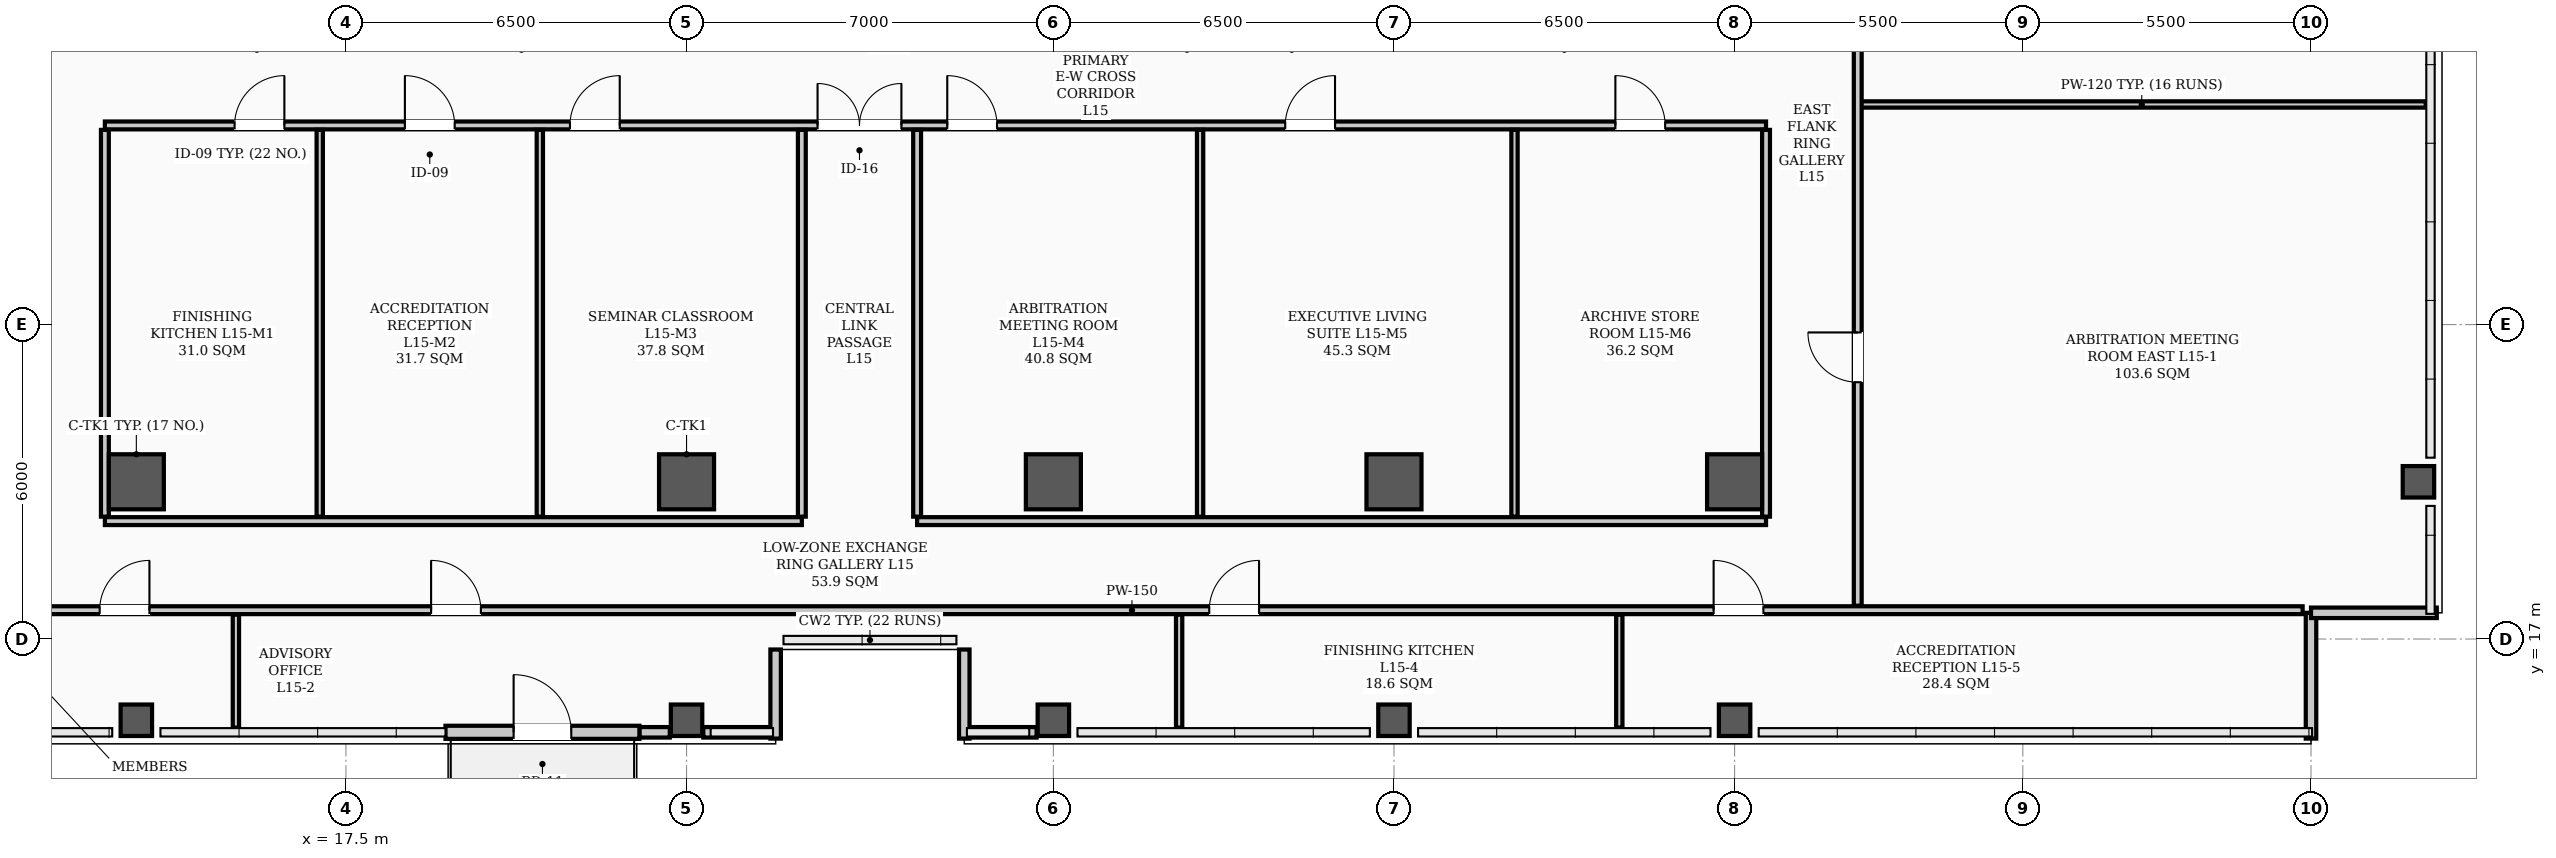
"""IFC4 building model, lengths in metres.
Left out: names, types, materials, properties, quantities, classifications, styles, units other than length and angle.
Written with IfcOpenShell. Run it as: python <this file> out.ifc"""

import sys

from ifc_helpers import new_model, si_unit, direction, frame, frame_2d, origin, origin_2d, place, context, subcontext, project, spatial, rectangle, hollow_rectangle, extrude, element, fill, save


model = new_model("IFC4")
c1 = context("Model", 3, precision=1e-05, world=origin(), true_north=direction((0.0, 1.0)))
c2 = subcontext(c1, "Body", "Model", "MODEL_VIEW")
j1 = project(units=[si_unit("LENGTHUNIT", "METRE"), si_unit("PLANEANGLEUNIT", "RADIAN")], contexts=[c1])
p1 = place(None, origin())
s1 = spatial("IfcSite", under=j1, at=p1, CompositionType="ELEMENT")
p2 = place(p1, origin())
s2 = spatial("IfcBuilding", under=s1, at=p2, CompositionType="ELEMENT")
p3 = place(p2, frame((0.0, 0.0, 61.6)))
s3 = spatial("IfcBuildingStorey", under=s2, at=p3, CompositionType="ELEMENT", Elevation=61.6)
for number, where, z_axis, x_axis in (
    (1, (13.5, 20.0, 0.0), (0.0, 0.0, 1.0), (1.0, 0.0, 0.0)),
    (2, (24.0, 20.0, 0.0), (0.0, 0.0, 1.0), (1.0, 0.0, 0.0)),
    (3, (31.0, 20.0, 0.0), (0.0, 0.0, 1.0), (1.0, 0.0, 0.0)),
    (4, (37.5, 20.0, 0.0), (0.0, 0.0, 1.0), (1.0, 0.0, 0.0)),
    (5, (44.0, 20.0, 0.0), (0.0, 0.0, 1.0), (1.0, 0.0, 0.0)),
):
    element("IfcColumn", number, at=place(p3, frame(where, z_axis=z_axis, x_axis=x_axis)), inside=s3, PredefinedType="COLUMN", context=c2, shape_type="SweptSolid", body=[
        extrude(hollow_rectangle(XDim=1.05, YDim=1.05, WallThickness=0.038, InnerFilletRadius=0.019, OuterFilletRadius=0.057, at=origin_2d()), origin(), (0.0, 0.0, 1.0), 3.9),
    ])
for number, where, z_axis, x_axis in (
    (6, (13.5, 15.45, 0.0), (0.0, 0.0, 1.0), (1.0, 0.0, 0.0)),
    (7, (24.0, 15.45, 0.0), (0.0, 0.0, 1.0), (1.0, 0.0, 0.0)),
    (8, (31.0, 15.45, 0.0), (0.0, 0.0, 1.0), (1.0, 0.0, 0.0)),
    (9, (37.5, 15.45, 0.0), (0.0, 0.0, 1.0), (1.0, 0.0, 0.0)),
    (10, (44.0, 15.45, 0.0), (0.0, 0.0, 1.0), (1.0, 0.0, 0.0)),
    (11, (57.05, 20.0, 0.0), (0.0, 0.0, 1.0), (1.0, 0.0, 0.0)),
):
    element("IfcColumn", number, at=place(p3, frame(where, z_axis=z_axis, x_axis=x_axis)), inside=s3, PredefinedType="COLUMN", context=c2, shape_type="SweptSolid", body=[
        extrude(hollow_rectangle(XDim=0.6, YDim=0.6, WallThickness=0.026, InnerFilletRadius=0.013, OuterFilletRadius=0.039, at=origin_2d()), origin(), (0.0, 0.0, 1.0), 3.9),
    ])
p4 = place(p3, frame((23.1, 15.22, 0.0), z_axis=(0.0, 0.0, 1.0), x_axis=(1.0, 0.0, 0.0)))
e12 = element("IfcWall", 12, at=p4, inside=s3, PredefinedType="PARAPET", context=c2, shape_type="SweptSolid", body=[
    extrude(rectangle(XDim=0.58, YDim=0.2, at=frame_2d((0.29, 0.0))), origin(), (0.0, 0.0, 1.0), 1.2),
])
for number, where, z_axis, x_axis in (
    (13, (24.32, 15.22, 0.0), (0.0, 0.0, 1.0), (1.0, 0.0, 0.0)),
    (14, (29.35, 15.22, 0.0), (0.0, 0.0, 1.0), (1.0, 0.0, 0.0)),
):
    element("IfcWall", number, at=place(p3, frame(where, z_axis=z_axis, x_axis=x_axis)), inside=s3, PredefinedType="PARAPET", context=c2, shape_type="SweptSolid", body=[
        extrude(rectangle(XDim=1.33, YDim=0.2, at=frame_2d((0.665, 0.0))), origin(), (0.0, 0.0, 1.0), 1.2),
    ])
for number, where, z_axis, x_axis in (
    (15, (55.0, 15.1, 0.0), (0.0, 0.0, 1.0), (0.0, 1.0, 0.0)),
    (16, (55.0, 17.5, 0.0), (0.0, 0.0, 1.0), (1.0, 0.0, 0.0)),
):
    element("IfcWall", number, at=place(p3, frame(where, z_axis=z_axis, x_axis=x_axis)), inside=s3, PredefinedType="PARAPET", context=c2, shape_type="SweptSolid", body=[
        extrude(rectangle(XDim=2.4, YDim=0.2, at=frame_2d((1.2, 0.0))), origin(), (0.0, 0.0, 1.0), 1.2),
    ])
for number, where, z_axis, x_axis in (
    (17, (25.7, 15.1, 0.0), (0.0, 0.0, 1.0), (0.0, 1.0, 0.0)),
    (18, (29.3, 16.8, 0.0), (0.0, 0.0, 1.0), (0.0, -1.0, 0.0)),
):
    element("IfcWall", number, at=place(p3, frame(where, z_axis=z_axis, x_axis=x_axis)), inside=s3, PredefinedType="PARAPET", context=c2, shape_type="SweptSolid", body=[
        extrude(rectangle(XDim=1.7, YDim=0.2, at=frame_2d((0.85, 0.0))), origin(), (0.0, 0.0, 1.0), 1.2),
    ])
p5 = place(p3, frame((19.4, 15.22, 0.0), z_axis=(0.0, 0.0, 1.0), x_axis=(1.0, 0.0, 0.0)))
e19 = element("IfcWall", 19, at=p5, inside=s3, PredefinedType="STANDARD", context=c2, shape_type="SweptSolid", body=[
    extrude(rectangle(XDim=3.7, YDim=0.25, at=frame_2d((1.85, 0.0))), origin(), (0.0, 0.0, 1.0), 3.18),
])
p6 = place(p5, frame((1.3, 0.0, 0.0)))
e20 = element("IfcOpeningElement", 20, at=p6, cuts=e19, PredefinedType="OPENING", context=c2, shape_type="SweptSolid", body=[
    extrude(rectangle(XDim=1.1, YDim=2.2, at=frame_2d((0.55, 1.1))), frame((0.0, 0.135, 0.0), z_axis=(0.0, -1.0, 0.0), x_axis=(1.0, 0.0, 0.0)), (0.0, 0.0, 1.0), 0.27),
])
p7 = place(p3, frame((12.9, 26.8, 0.0), z_axis=(0.0, 0.0, 1.0), x_axis=(1.0, 0.0, 0.0)))
e21 = element("IfcWall", 21, at=p7, inside=s3, PredefinedType="PARTITIONING", context=c2, shape_type="SweptSolid", body=[
    extrude(rectangle(XDim=31.7, YDim=0.15, at=frame_2d((15.85, 0.0))), origin(), (0.0, 0.0, 1.0), 3.1),
])
p8 = place(p7, frame((13.6, 0.0, 0.0)))
e22 = element("IfcOpeningElement", 22, at=p8, cuts=e21, PredefinedType="OPENING", context=c2, shape_type="SweptSolid", body=[
    extrude(rectangle(XDim=1.6, YDim=2.08, at=frame_2d((0.8, 1.04))), frame((0.0, 0.085, 0.0), z_axis=(0.0, -1.0, 0.0), x_axis=(1.0, 0.0, 0.0)), (0.0, 0.0, 1.0), 0.17),
])
p9 = place(p7, frame((2.475, 0.0, 0.0)))
e23 = element("IfcOpeningElement", 23, at=p9, cuts=e21, PredefinedType="OPENING", context=c2, shape_type="SweptSolid", body=[
    extrude(rectangle(XDim=0.95, YDim=2.08, at=frame_2d((0.475, 1.04))), frame((0.0, 0.085, 0.0), z_axis=(0.0, -1.0, 0.0), x_axis=(1.0, 0.0, 0.0)), (0.0, 0.0, 1.0), 0.17),
])
p10 = place(p7, frame((5.725, 0.0, 0.0)))
e24 = element("IfcOpeningElement", 24, at=p10, cuts=e21, PredefinedType="OPENING", context=c2, shape_type="SweptSolid", body=[
    extrude(rectangle(XDim=0.95, YDim=2.08, at=frame_2d((0.475, 1.04))), frame((0.0, 0.085, 0.0), z_axis=(0.0, -1.0, 0.0), x_axis=(1.0, 0.0, 0.0)), (0.0, 0.0, 1.0), 0.17),
])
p11 = place(p7, frame((8.875, 0.0, 0.0)))
e25 = element("IfcOpeningElement", 25, at=p11, cuts=e21, PredefinedType="OPENING", context=c2, shape_type="SweptSolid", body=[
    extrude(rectangle(XDim=0.95, YDim=2.08, at=frame_2d((0.475, 1.04))), frame((0.0, 0.085, 0.0), z_axis=(0.0, -1.0, 0.0), x_axis=(1.0, 0.0, 0.0)), (0.0, 0.0, 1.0), 0.17),
])
p12 = place(p7, frame((16.075, 0.0, 0.0)))
e26 = element("IfcOpeningElement", 26, at=p12, cuts=e21, PredefinedType="OPENING", context=c2, shape_type="SweptSolid", body=[
    extrude(rectangle(XDim=0.95, YDim=2.08, at=frame_2d((0.475, 1.04))), frame((0.0, 0.085, 0.0), z_axis=(0.0, -1.0, 0.0), x_axis=(1.0, 0.0, 0.0)), (0.0, 0.0, 1.0), 0.17),
])
p13 = place(p7, frame((22.525, 0.0, 0.0)))
e27 = element("IfcOpeningElement", 27, at=p13, cuts=e21, PredefinedType="OPENING", context=c2, shape_type="SweptSolid", body=[
    extrude(rectangle(XDim=0.95, YDim=2.08, at=frame_2d((0.475, 1.04))), frame((0.0, 0.085, 0.0), z_axis=(0.0, -1.0, 0.0), x_axis=(1.0, 0.0, 0.0)), (0.0, 0.0, 1.0), 0.17),
])
p14 = place(p7, frame((28.825, 0.0, 0.0)))
e28 = element("IfcOpeningElement", 28, at=p14, cuts=e21, PredefinedType="OPENING", context=c2, shape_type="SweptSolid", body=[
    extrude(rectangle(XDim=0.95, YDim=2.08, at=frame_2d((0.475, 1.04))), frame((0.0, 0.085, 0.0), z_axis=(0.0, -1.0, 0.0), x_axis=(1.0, 0.0, 0.0)), (0.0, 0.0, 1.0), 0.17),
])
p15 = place(p3, frame((10.16, 17.55, 0.0), z_axis=(0.0, 0.0, 1.0), x_axis=(1.0, 0.0, 0.0)))
e29 = element("IfcWall", 29, at=p15, inside=s3, PredefinedType="PARTITIONING", context=c2, shape_type="SweptSolid", body=[
    extrude(rectangle(XDim=44.68, YDim=0.15, at=frame_2d((22.34, 0.0))), origin(), (0.0, 0.0, 1.0), 3.1),
])
p16 = place(p15, frame((2.64, 0.0, 0.0)))
e30 = element("IfcOpeningElement", 30, at=p16, cuts=e29, PredefinedType="OPENING", context=c2, shape_type="SweptSolid", body=[
    extrude(rectangle(XDim=0.95, YDim=2.08, at=frame_2d((0.475, 1.04))), frame((0.0, 0.085, 0.0), z_axis=(0.0, -1.0, 0.0), x_axis=(1.0, 0.0, 0.0)), (0.0, 0.0, 1.0), 0.17),
])
p17 = place(p15, frame((8.965, 0.0, 0.0)))
e31 = element("IfcOpeningElement", 31, at=p17, cuts=e29, PredefinedType="OPENING", context=c2, shape_type="SweptSolid", body=[
    extrude(rectangle(XDim=0.95, YDim=2.08, at=frame_2d((0.475, 1.04))), frame((0.0, 0.085, 0.0), z_axis=(0.0, -1.0, 0.0), x_axis=(1.0, 0.0, 0.0)), (0.0, 0.0, 1.0), 0.17),
])
p18 = place(p15, frame((23.815, 0.0, 0.0)))
e32 = element("IfcOpeningElement", 32, at=p18, cuts=e29, PredefinedType="OPENING", context=c2, shape_type="SweptSolid", body=[
    extrude(rectangle(XDim=0.95, YDim=2.08, at=frame_2d((0.475, 1.04))), frame((0.0, 0.085, 0.0), z_axis=(0.0, -1.0, 0.0), x_axis=(1.0, 0.0, 0.0)), (0.0, 0.0, 1.0), 0.17),
])
p19 = place(p15, frame((33.44, 0.0, 0.0)))
e33 = element("IfcOpeningElement", 33, at=p19, cuts=e29, PredefinedType="OPENING", context=c2, shape_type="SweptSolid", body=[
    extrude(rectangle(XDim=0.95, YDim=2.08, at=frame_2d((0.475, 1.04))), frame((0.0, 0.085, 0.0), z_axis=(0.0, -1.0, 0.0), x_axis=(1.0, 0.0, 0.0)), (0.0, 0.0, 1.0), 0.17),
])
p20 = place(p3, frame((12.9, 19.25, 0.0), z_axis=(0.0, 0.0, 1.0), x_axis=(1.0, 0.0, 0.0)))
e34 = element("IfcWall", 34, at=p20, inside=s3, PredefinedType="PARTITIONING", context=c2, shape_type="SweptSolid", body=[
    extrude(rectangle(XDim=13.3, YDim=0.15, at=frame_2d((6.65, 0.0))), origin(), (0.0, 0.0, 1.0), 3.1),
])
p21 = place(p3, frame((28.4, 19.25, 0.0), z_axis=(0.0, 0.0, 1.0), x_axis=(1.0, 0.0, 0.0)))
e35 = element("IfcWall", 35, at=p21, inside=s3, PredefinedType="PARTITIONING", context=c2, shape_type="SweptSolid", body=[
    extrude(rectangle(XDim=16.2, YDim=0.15, at=frame_2d((8.1, 0.0))), origin(), (0.0, 0.0, 1.0), 3.1),
])
p22 = place(p3, frame((46.35, 27.2, 0.0), z_axis=(0.0, 0.0, 1.0), x_axis=(1.0, 0.0, 0.0)))
e36 = element("IfcWall", 36, at=p22, inside=s3, PredefinedType="PARTITIONING", context=c2, shape_type="SweptSolid", body=[
    extrude(rectangle(XDim=10.84, YDim=0.12, at=frame_2d((5.42, 0.0))), origin(), (0.0, 0.0, 1.0), 3.212),
])
for number, where, z_axis, x_axis in (
    (37, (26.2, 19.335, 0.0), (0.0, 0.0, 1.0), (0.0, 1.0, 0.0)),
    (38, (28.4, 19.335, 0.0), (0.0, 0.0, 1.0), (0.0, 1.0, 0.0)),
    (39, (12.9, 19.335, 0.0), (0.0, 0.0, 1.0), (0.0, 1.0, 0.0)),
):
    element("IfcWall", number, at=place(p3, frame(where, z_axis=z_axis, x_axis=x_axis)), inside=s3, PredefinedType="PARTITIONING", context=c2, shape_type="SweptSolid", body=[
        extrude(rectangle(XDim=7.38, YDim=0.15, at=frame_2d((3.69, 0.0))), origin(), (0.0, 0.0, 1.0), 3.0),
    ])
p23 = place(p3, frame((46.35, 17.635, 0.0), z_axis=(0.0, 0.0, 1.0), x_axis=(0.0, 1.0, 0.0)))
e40 = element("IfcWall", 40, at=p23, inside=s3, PredefinedType="PARTITIONING", context=c2, shape_type="SweptSolid", body=[
    extrude(rectangle(XDim=22.53, YDim=0.15, at=frame_2d((11.265, 0.0))), origin(), (0.0, 0.0, 1.0), 3.0),
])
p24 = place(p23, frame((4.265, 0.0, 0.0)))
e41 = element("IfcOpeningElement", 41, at=p24, cuts=e40, PredefinedType="OPENING", context=c2, shape_type="SweptSolid", body=[
    extrude(rectangle(XDim=0.95, YDim=2.08, at=frame_2d((0.475, 1.04))), frame((0.0, 0.085, 0.0), z_axis=(0.0, -1.0, 0.0), x_axis=(1.0, 0.0, 0.0)), (0.0, 0.0, 1.0), 0.17),
])
p25 = place(p23, frame((12.39, 0.0, 0.0)))
e42 = element("IfcOpeningElement", 42, at=p25, cuts=e40, PredefinedType="OPENING", context=c2, shape_type="SweptSolid", body=[
    extrude(rectangle(XDim=0.95, YDim=2.08, at=frame_2d((0.475, 1.04))), frame((0.0, 0.085, 0.0), z_axis=(0.0, -1.0, 0.0), x_axis=(1.0, 0.0, 0.0)), (0.0, 0.0, 1.0), 0.17),
])
p26 = place(p23, frame((18.915, 0.0, 0.0)))
e43 = element("IfcOpeningElement", 43, at=p26, cuts=e40, PredefinedType="OPENING", context=c2, shape_type="SweptSolid", body=[
    extrude(rectangle(XDim=0.95, YDim=2.08, at=frame_2d((0.475, 1.04))), frame((0.0, 0.085, 0.0), z_axis=(0.0, -1.0, 0.0), x_axis=(1.0, 0.0, 0.0)), (0.0, 0.0, 1.0), 0.17),
])
p27 = place(p3, frame((44.6, 19.335, 0.0), z_axis=(0.0, 0.0, 1.0), x_axis=(0.0, 1.0, 0.0)))
e44 = element("IfcWall", 44, at=p27, inside=s3, PredefinedType="PARTITIONING", context=c2, shape_type="SweptSolid", body=[
    extrude(rectangle(XDim=7.38, YDim=0.15, at=frame_2d((3.69, 0.0))), origin(), (0.0, 0.0, 1.0), 3.0),
])
for number, where, z_axis, x_axis in (
    (45, (15.4, 15.31, 0.0), (0.0, 0.0, 1.0), (0.0, 1.0, 0.0)),
    (46, (33.4, 15.31, 0.0), (0.0, 0.0, 1.0), (0.0, 1.0, 0.0)),
    (47, (41.8, 15.31, 0.0), (0.0, 0.0, 1.0), (0.0, 1.0, 0.0)),
):
    element("IfcWall", number, at=place(p3, frame(where, z_axis=z_axis, x_axis=x_axis)), inside=s3, PredefinedType="PARTITIONING", context=c2, shape_type="SweptSolid", body=[
        extrude(rectangle(XDim=2.155, YDim=0.12, at=frame_2d((1.078, 0.0))), origin(), (0.0, 0.0, 1.0), 3.212),
    ])
for number, where, z_axis, x_axis in (
    (48, (17.0, 19.335, 0.0), (0.0, 0.0, 1.0), (0.0, 1.0, 0.0)),
    (49, (21.2, 19.335, 0.0), (0.0, 0.0, 1.0), (0.0, 1.0, 0.0)),
    (50, (33.8, 19.335, 0.0), (0.0, 0.0, 1.0), (0.0, 1.0, 0.0)),
    (51, (39.8, 19.335, 0.0), (0.0, 0.0, 1.0), (0.0, 1.0, 0.0)),
):
    element("IfcWall", number, at=place(p3, frame(where, z_axis=z_axis, x_axis=x_axis)), inside=s3, PredefinedType="PARTITIONING", context=c2, shape_type="SweptSolid", body=[
        extrude(rectangle(XDim=7.38, YDim=0.12, at=frame_2d((3.69, 0.0))), origin(), (0.0, 0.0, 1.0), 3.0),
    ])
p28 = place(p6, origin())
e52 = element("IfcDoor", 52, at=p28, inside=s3, OperationType="SINGLE_SWING_LEFT", PredefinedType="DOOR", context=c2, shape_type="SweptSolid", body=[
    extrude(rectangle(XDim=1.1, YDim=2.2, at=frame_2d((0.55, 1.1))), frame((0.0, 0.025, 0.0), z_axis=(0.0, -1.0, 0.0), x_axis=(1.0, 0.0, 0.0)), (0.0, 0.0, 1.0), 0.05),
])
fill(e20, e52)
p29 = place(p8, origin())
e53 = element("IfcDoor", 53, at=p29, inside=s3, OperationType="DOUBLE_DOOR_SINGLE_SWING", PredefinedType="DOOR", context=c2, shape_type="SweptSolid", body=[
    extrude(rectangle(XDim=1.6, YDim=2.08, at=frame_2d((0.8, 1.04))), frame((0.0, 0.025, 0.0), z_axis=(0.0, -1.0, 0.0), x_axis=(1.0, 0.0, 0.0)), (0.0, 0.0, 1.0), 0.05),
])
fill(e22, e53)
p30 = place(p16, origin())
e54 = element("IfcDoor", 54, at=p30, inside=s3, OperationType="SINGLE_SWING_RIGHT", PredefinedType="DOOR", context=c2, shape_type="SweptSolid", body=[
    extrude(rectangle(XDim=0.95, YDim=2.08, at=frame_2d((0.475, 1.04))), frame((0.0, 0.025, 0.0), z_axis=(0.0, -1.0, 0.0), x_axis=(1.0, 0.0, 0.0)), (0.0, 0.0, 1.0), 0.05),
])
fill(e30, e54)
p31 = place(p17, origin())
e55 = element("IfcDoor", 55, at=p31, inside=s3, OperationType="SINGLE_SWING_LEFT", PredefinedType="DOOR", context=c2, shape_type="SweptSolid", body=[
    extrude(rectangle(XDim=0.95, YDim=2.08, at=frame_2d((0.475, 1.04))), frame((0.0, 0.025, 0.0), z_axis=(0.0, -1.0, 0.0), x_axis=(1.0, 0.0, 0.0)), (0.0, 0.0, 1.0), 0.05),
])
fill(e31, e55)
p32 = place(p18, origin())
e56 = element("IfcDoor", 56, at=p32, inside=s3, OperationType="SINGLE_SWING_RIGHT", PredefinedType="DOOR", context=c2, shape_type="SweptSolid", body=[
    extrude(rectangle(XDim=0.95, YDim=2.08, at=frame_2d((0.475, 1.04))), frame((0.0, 0.025, 0.0), z_axis=(0.0, -1.0, 0.0), x_axis=(1.0, 0.0, 0.0)), (0.0, 0.0, 1.0), 0.05),
])
fill(e32, e56)
p33 = place(p19, origin())
e57 = element("IfcDoor", 57, at=p33, inside=s3, OperationType="SINGLE_SWING_LEFT", PredefinedType="DOOR", context=c2, shape_type="SweptSolid", body=[
    extrude(rectangle(XDim=0.95, YDim=2.08, at=frame_2d((0.475, 1.04))), frame((0.0, 0.025, 0.0), z_axis=(0.0, -1.0, 0.0), x_axis=(1.0, 0.0, 0.0)), (0.0, 0.0, 1.0), 0.05),
])
fill(e33, e57)
p34 = place(p9, origin())
e58 = element("IfcDoor", 58, at=p34, inside=s3, OperationType="SINGLE_SWING_RIGHT", PredefinedType="DOOR", context=c2, shape_type="SweptSolid", body=[
    extrude(rectangle(XDim=0.95, YDim=2.08, at=frame_2d((0.475, 1.04))), frame((0.0, 0.025, 0.0), z_axis=(0.0, -1.0, 0.0), x_axis=(1.0, 0.0, 0.0)), (0.0, 0.0, 1.0), 0.05),
])
fill(e23, e58)
p35 = place(p10, origin())
e59 = element("IfcDoor", 59, at=p35, inside=s3, OperationType="SINGLE_SWING_LEFT", PredefinedType="DOOR", context=c2, shape_type="SweptSolid", body=[
    extrude(rectangle(XDim=0.95, YDim=2.08, at=frame_2d((0.475, 1.04))), frame((0.0, 0.025, 0.0), z_axis=(0.0, -1.0, 0.0), x_axis=(1.0, 0.0, 0.0)), (0.0, 0.0, 1.0), 0.05),
])
fill(e24, e59)
p36 = place(p11, origin())
e60 = element("IfcDoor", 60, at=p36, inside=s3, OperationType="SINGLE_SWING_RIGHT", PredefinedType="DOOR", context=c2, shape_type="SweptSolid", body=[
    extrude(rectangle(XDim=0.95, YDim=2.08, at=frame_2d((0.475, 1.04))), frame((0.0, 0.025, 0.0), z_axis=(0.0, -1.0, 0.0), x_axis=(1.0, 0.0, 0.0)), (0.0, 0.0, 1.0), 0.05),
])
fill(e25, e60)
p37 = place(p12, origin())
e61 = element("IfcDoor", 61, at=p37, inside=s3, OperationType="SINGLE_SWING_LEFT", PredefinedType="DOOR", context=c2, shape_type="SweptSolid", body=[
    extrude(rectangle(XDim=0.95, YDim=2.08, at=frame_2d((0.475, 1.04))), frame((0.0, 0.025, 0.0), z_axis=(0.0, -1.0, 0.0), x_axis=(1.0, 0.0, 0.0)), (0.0, 0.0, 1.0), 0.05),
])
fill(e26, e61)
p38 = place(p13, origin())
e62 = element("IfcDoor", 62, at=p38, inside=s3, OperationType="SINGLE_SWING_RIGHT", PredefinedType="DOOR", context=c2, shape_type="SweptSolid", body=[
    extrude(rectangle(XDim=0.95, YDim=2.08, at=frame_2d((0.475, 1.04))), frame((0.0, 0.025, 0.0), z_axis=(0.0, -1.0, 0.0), x_axis=(1.0, 0.0, 0.0)), (0.0, 0.0, 1.0), 0.05),
])
fill(e27, e62)
p39 = place(p14, origin())
e63 = element("IfcDoor", 63, at=p39, inside=s3, OperationType="SINGLE_SWING_LEFT", PredefinedType="DOOR", context=c2, shape_type="SweptSolid", body=[
    extrude(rectangle(XDim=0.95, YDim=2.08, at=frame_2d((0.475, 1.04))), frame((0.0, 0.025, 0.0), z_axis=(0.0, -1.0, 0.0), x_axis=(1.0, 0.0, 0.0)), (0.0, 0.0, 1.0), 0.05),
])
fill(e28, e63)
p40 = place(p24, origin())
e64 = element("IfcDoor", 64, at=p40, inside=s3, OperationType="SINGLE_SWING_RIGHT", PredefinedType="DOOR", context=c2, shape_type="SweptSolid", body=[
    extrude(rectangle(XDim=0.95, YDim=2.08, at=frame_2d((0.475, 1.04))), frame((0.0, 0.025, 0.0), z_axis=(0.0, -1.0, 0.0), x_axis=(1.0, 0.0, 0.0)), (0.0, 0.0, 1.0), 0.05),
])
fill(e41, e64)
save(model, sys.argv[1])
